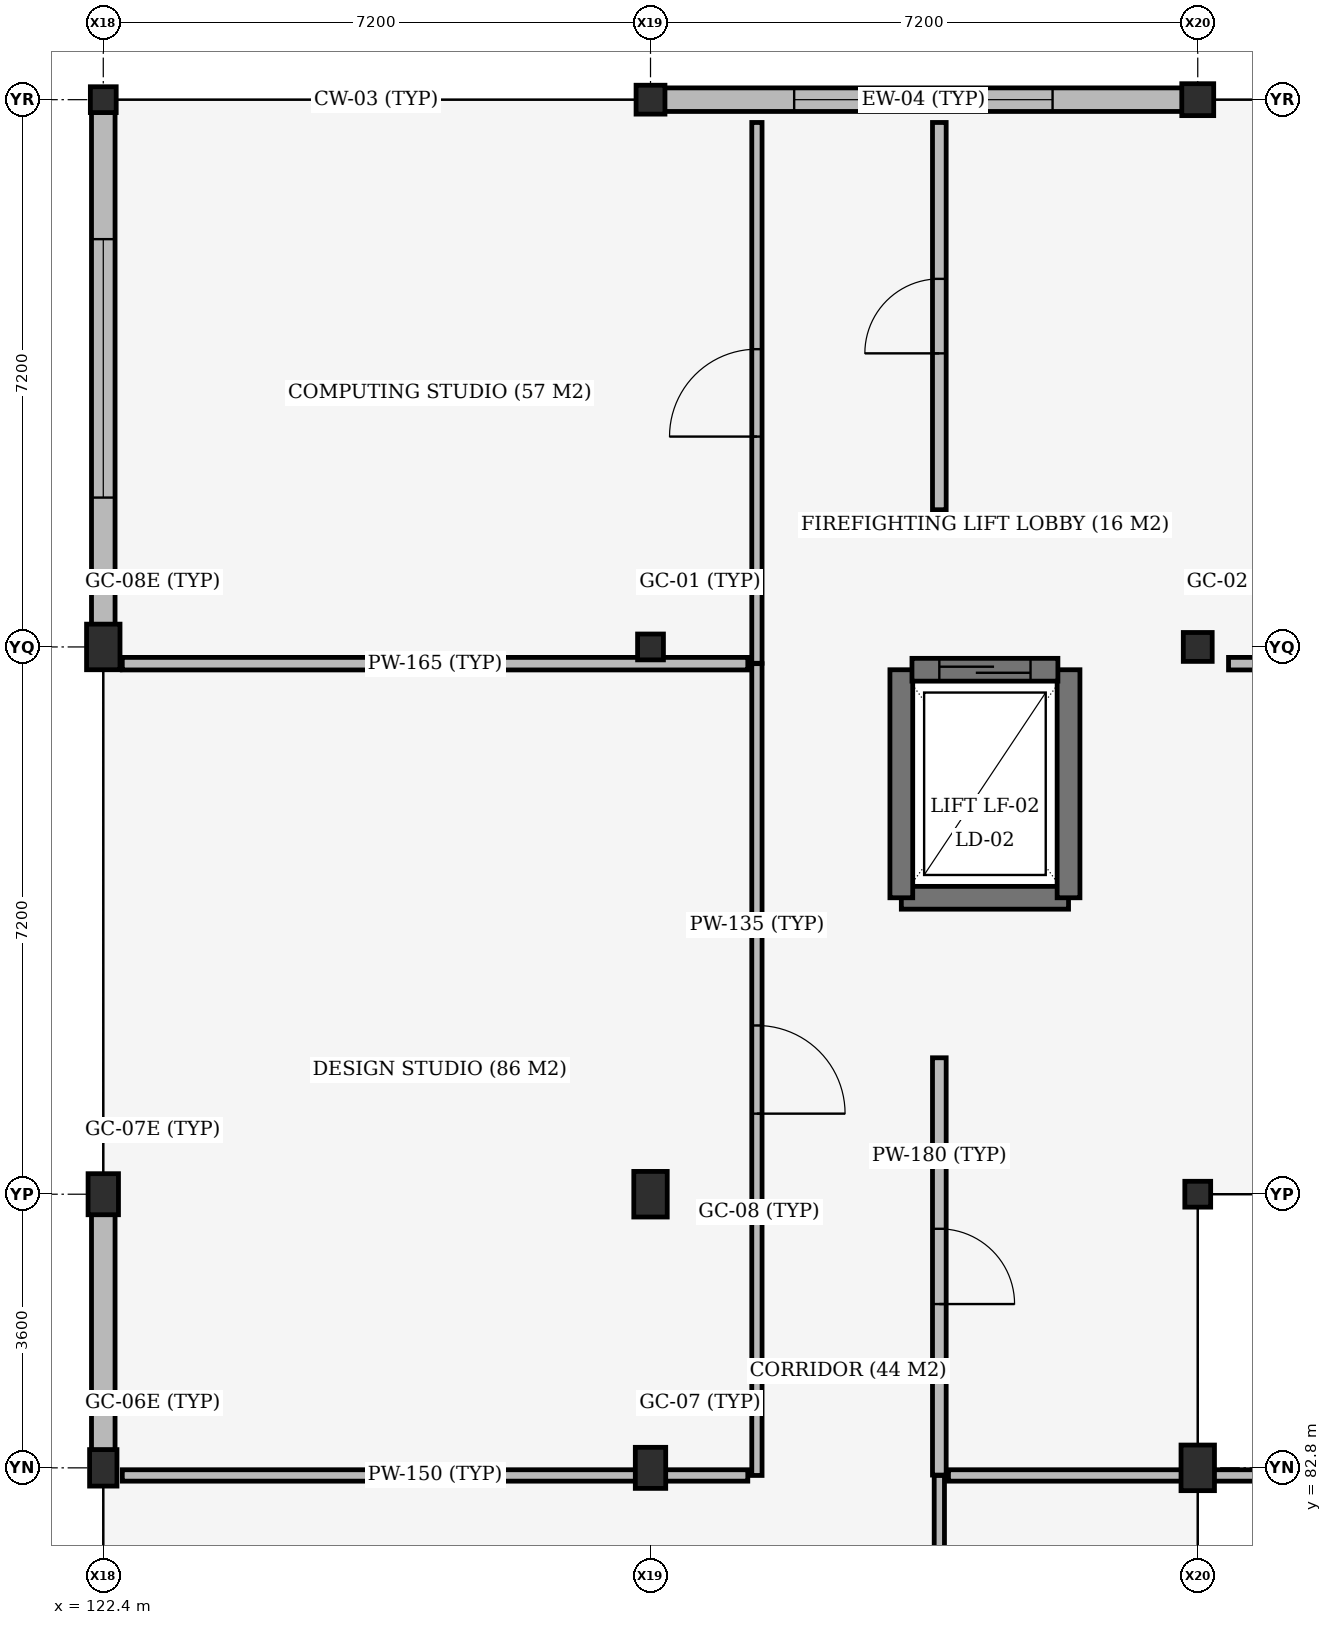
"""IFC4 building model, lengths in metres.
Left out: names, types, materials, properties, quantities, classifications, styles, units other than length and angle.
Written with IfcOpenShell. Run it as: python <this file> out.ifc"""

import sys

from ifc_helpers import new_model, si_unit, direction, frame, frame_2d, origin, origin_2d, place, context, subcontext, project, spatial, rectangle, extrude, element, fill, save


model = new_model("IFC4")
c1 = context("Model", 3, precision=1e-05, world=origin(), true_north=direction((0.0, 1.0)))
c2 = subcontext(c1, "Body", "Model", "MODEL_VIEW")
j1 = project(units=[si_unit("LENGTHUNIT", "METRE"), si_unit("PLANEANGLEUNIT", "RADIAN")], contexts=[c1])
p1 = place(None, origin())
s1 = spatial("IfcSite", under=j1, at=p1, CompositionType="ELEMENT")
p2 = place(p1, origin())
s2 = spatial("IfcBuilding", under=s1, at=p2, CompositionType="ELEMENT")
p3 = place(p2, frame((0.0, 0.0, 13.8)))
s3 = spatial("IfcBuildingStorey", under=s2, at=p3, CompositionType="ELEMENT", Elevation=13.8)
p4 = place(p3, frame((122.4, 82.8, 0.0), z_axis=(0.0, 0.0, 1.0), x_axis=(1.0, 0.0, 0.0)))
e1 = element("IfcColumn", 1, at=p4, inside=s3, PredefinedType="COLUMN", context=c2, shape_type="SweptSolid", body=[
    extrude(rectangle(XDim=0.36, YDim=0.48, at=origin_2d()), origin(), (0.0, 0.0, 1.0), 3.935),
])
p5 = place(p3, frame((122.4, 86.4, 0.0), z_axis=(0.0, 0.0, 1.0), x_axis=(1.0, 0.0, 0.0)))
e2 = element("IfcColumn", 2, at=p5, inside=s3, PredefinedType="COLUMN", context=c2, shape_type="SweptSolid", body=[
    extrude(rectangle(XDim=0.4, YDim=0.54, at=origin_2d()), origin(), (0.0, 0.0, 1.0), 3.935),
])
p6 = place(p3, frame((122.4, 93.6, 0.0), z_axis=(0.0, 0.0, 1.0), x_axis=(1.0, 0.0, 0.0)))
e3 = element("IfcColumn", 3, at=p6, inside=s3, PredefinedType="COLUMN", context=c2, shape_type="SweptSolid", body=[
    extrude(rectangle(XDim=0.44, YDim=0.6, at=origin_2d()), origin(), (0.0, 0.0, 1.0), 3.935),
])
p7 = place(p3, frame((122.4, 100.8, 0.0), z_axis=(0.0, 0.0, 1.0), x_axis=(1.0, 0.0, 0.0)))
e4 = element("IfcColumn", 4, at=p7, inside=s3, PredefinedType="COLUMN", context=c2, shape_type="SweptSolid", body=[
    extrude(rectangle(XDim=0.34, YDim=0.34, at=origin_2d()), origin(), (0.0, 0.0, 1.0), 3.935),
])
p8 = place(p3, frame((129.6, 82.8, 0.0), z_axis=(0.0, 0.0, 1.0), x_axis=(1.0, 0.0, 0.0)))
e5 = element("IfcColumn", 5, at=p8, inside=s3, PredefinedType="COLUMN", context=c2, shape_type="SweptSolid", body=[
    extrude(rectangle(XDim=0.4, YDim=0.54, at=origin_2d()), origin(), (0.0, 0.0, 1.0), 3.935),
])
p9 = place(p3, frame((129.6, 86.4, 0.0), z_axis=(0.0, 0.0, 1.0), x_axis=(1.0, 0.0, 0.0)))
e6 = element("IfcColumn", 6, at=p9, inside=s3, PredefinedType="COLUMN", context=c2, shape_type="SweptSolid", body=[
    extrude(rectangle(XDim=0.44, YDim=0.6, at=origin_2d()), origin(), (0.0, 0.0, 1.0), 3.935),
])
p10 = place(p3, frame((129.6, 93.6, 0.0), z_axis=(0.0, 0.0, 1.0), x_axis=(1.0, 0.0, 0.0)))
e7 = element("IfcColumn", 7, at=p10, inside=s3, PredefinedType="COLUMN", context=c2, shape_type="SweptSolid", body=[
    extrude(rectangle(XDim=0.34, YDim=0.34, at=origin_2d()), origin(), (0.0, 0.0, 1.0), 3.935),
])
p11 = place(p3, frame((129.6, 100.8, 0.0), z_axis=(0.0, 0.0, 1.0), x_axis=(1.0, 0.0, 0.0)))
e8 = element("IfcColumn", 8, at=p11, inside=s3, PredefinedType="COLUMN", context=c2, shape_type="SweptSolid", body=[
    extrude(rectangle(XDim=0.38, YDim=0.38, at=origin_2d()), origin(), (0.0, 0.0, 1.0), 3.935),
])
p12 = place(p3, frame((136.8, 82.8, 0.0), z_axis=(0.0, 0.0, 1.0), x_axis=(1.0, 0.0, 0.0)))
e9 = element("IfcColumn", 9, at=p12, inside=s3, PredefinedType="COLUMN", context=c2, shape_type="SweptSolid", body=[
    extrude(rectangle(XDim=0.44, YDim=0.6, at=origin_2d()), origin(), (0.0, 0.0, 1.0), 3.935),
])
p13 = place(p3, frame((136.8, 86.4, 0.0), z_axis=(0.0, 0.0, 1.0), x_axis=(1.0, 0.0, 0.0)))
e10 = element("IfcColumn", 10, at=p13, inside=s3, PredefinedType="COLUMN", context=c2, shape_type="SweptSolid", body=[
    extrude(rectangle(XDim=0.34, YDim=0.34, at=origin_2d()), origin(), (0.0, 0.0, 1.0), 3.935),
])
p14 = place(p3, frame((136.8, 93.6, 0.0), z_axis=(0.0, 0.0, 1.0), x_axis=(1.0, 0.0, 0.0)))
e11 = element("IfcColumn", 11, at=p14, inside=s3, PredefinedType="COLUMN", context=c2, shape_type="SweptSolid", body=[
    extrude(rectangle(XDim=0.38, YDim=0.38, at=origin_2d()), origin(), (0.0, 0.0, 1.0), 3.935),
])
p15 = place(p3, frame((136.8, 100.8, 0.0), z_axis=(0.0, 0.0, 1.0), x_axis=(1.0, 0.0, 0.0)))
e12 = element("IfcColumn", 12, at=p15, inside=s3, PredefinedType="COLUMN", context=c2, shape_type="SweptSolid", body=[
    extrude(rectangle(XDim=0.42, YDim=0.42, at=origin_2d()), origin(), (0.0, 0.0, 1.0), 3.935),
])
p16 = place(p3, frame((132.9, 90.3, 0.0), z_axis=(0.0, 0.0, 1.0), x_axis=(1.0, 0.0, 0.0)))
e13 = element("IfcWall", 13, at=p16, inside=s3, PredefinedType="SHEAR", context=c2, shape_type="SweptSolid", body=[
    extrude(rectangle(XDim=2.2, YDim=0.3, at=frame_2d((1.1, 0.0))), origin(), (0.0, 0.0, 1.0), 3.935),
])
for number, where, z_axis, x_axis in (
    (14, (132.9, 93.3, 0.0), (0.0, 0.0, 1.0), (0.0, -1.0, 0.0)),
    (15, (135.1, 90.3, 0.0), (0.0, 0.0, 1.0), (0.0, 1.0, 0.0)),
):
    element("IfcWall", number, at=place(p3, frame(where, z_axis=z_axis, x_axis=x_axis)), inside=s3, PredefinedType="SHEAR", context=c2, shape_type="SweptSolid", body=[
        extrude(rectangle(XDim=3.0, YDim=0.3, at=frame_2d((1.5, 0.0))), origin(), (0.0, 0.0, 1.0), 3.935),
    ])
p17 = place(p3, frame((129.782, 100.8, 0.0), z_axis=(0.0, 0.0, 1.0), x_axis=(1.0, 0.0, 0.0)))
e16 = element("IfcWall", 16, at=p17, inside=s3, PredefinedType="STANDARD", context=c2, shape_type="SweptSolid", body=[
    extrude(rectangle(XDim=6.816, YDim=0.31, at=frame_2d((3.408, 0.0))), origin(), (0.0, 0.0, 1.0), 3.195),
])
p18 = place(p17, frame((1.708, 0.0, 0.9)))
e17 = element("IfcOpeningElement", 17, at=p18, cuts=e16, PredefinedType="OPENING", context=c2, shape_type="SweptSolid", body=[
    extrude(rectangle(XDim=3.4, YDim=1.5, at=frame_2d((1.7, 0.75))), frame((0.0, 0.165, 0.0), z_axis=(0.0, -1.0, 0.0), x_axis=(1.0, 0.0, 0.0)), (0.0, 0.0, 1.0), 0.33),
])
p19 = place(p3, frame((122.4, 83.032, 0.0), z_axis=(0.0, 0.0, 1.0), x_axis=(0.0, 1.0, 0.0)))
e18 = element("IfcWall", 18, at=p19, inside=s3, PredefinedType="STANDARD", context=c2, shape_type="SweptSolid", body=[
    extrude(rectangle(XDim=3.106, YDim=0.31, at=frame_2d((1.553, 0.0))), origin(), (0.0, 0.0, 1.0), 3.295),
])
p20 = place(p3, frame((122.4, 93.892, 0.0), z_axis=(0.0, 0.0, 1.0), x_axis=(0.0, 1.0, 0.0)))
e19 = element("IfcWall", 19, at=p20, inside=s3, PredefinedType="STANDARD", context=c2, shape_type="SweptSolid", body=[
    extrude(rectangle(XDim=6.746, YDim=0.31, at=frame_2d((3.373, 0.0))), origin(), (0.0, 0.0, 1.0), 3.195),
])
p21 = place(p20, frame((1.673, 0.0, 0.9)))
e20 = element("IfcOpeningElement", 20, at=p21, cuts=e19, PredefinedType="OPENING", context=c2, shape_type="SweptSolid", body=[
    extrude(rectangle(XDim=3.4, YDim=1.5, at=frame_2d((1.7, 0.75))), frame((0.0, 0.165, 0.0), z_axis=(0.0, -1.0, 0.0), x_axis=(1.0, 0.0, 0.0)), (0.0, 0.0, 1.0), 0.33),
])
p22 = place(p3, frame((133.04, 93.3, 0.0), z_axis=(0.0, 0.0, 1.0), x_axis=(1.0, 0.0, 0.0)))
e21 = element("IfcWall", 21, at=p22, inside=s3, PredefinedType="SHEAR", context=c2, shape_type="SweptSolid", body=[
    extrude(rectangle(XDim=1.92, YDim=0.3, at=frame_2d((0.96, 0.0))), origin(), (0.0, 0.0, 1.0), 3.935),
])
p23 = place(p22, frame((0.36, 0.0, 0.0)))
e22 = element("IfcOpeningElement", 22, at=p23, cuts=e21, PredefinedType="OPENING", context=c2, shape_type="SweptSolid", body=[
    extrude(rectangle(XDim=1.2, YDim=2.1, at=frame_2d((0.6, 1.05))), frame((0.0, 0.16, 0.0), z_axis=(0.0, -1.0, 0.0), x_axis=(1.0, 0.0, 0.0)), (0.0, 0.0, 1.0), 0.32),
])
p24 = place(p3, frame((122.65, 82.7, 0.0), z_axis=(0.0, 0.0, 1.0), x_axis=(1.0, 0.0, 0.0)))
e23 = element("IfcWall", 23, at=p24, inside=s3, PredefinedType="PARTITIONING", context=c2, shape_type="SweptSolid", body=[
    extrude(rectangle(XDim=8.23, YDim=0.15, at=frame_2d((4.115, 0.0))), origin(), (0.0, 0.0, 1.0), 3.355),
])
p25 = place(p3, frame((131.0, 82.7, 0.0), z_axis=(0.0, 0.0, 1.0), x_axis=(0.0, 1.0, 0.0)))
e24 = element("IfcWall", 24, at=p25, inside=s3, PredefinedType="PARTITIONING", context=c2, shape_type="SweptSolid", body=[
    extrude(rectangle(XDim=10.68, YDim=0.135, at=frame_2d((5.34, 0.0))), origin(), (0.0, 0.0, 1.0), 3.355),
])
p26 = place(p25, frame((4.76, 0.0, 0.0)))
e25 = element("IfcOpeningElement", 25, at=p26, cuts=e24, PredefinedType="OPENING", context=c2, shape_type="SweptSolid", body=[
    extrude(rectangle(XDim=1.16, YDim=2.2, at=frame_2d((0.58, 1.1))), frame((0.0, 0.077, 0.0), z_axis=(0.0, -1.0, 0.0), x_axis=(1.0, 0.0, 0.0)), (0.0, 0.0, 1.0), 0.155),
])
p27 = place(p3, frame((122.65, 93.38, 0.0), z_axis=(0.0, 0.0, 1.0), x_axis=(1.0, 0.0, 0.0)))
e26 = element("IfcWall", 26, at=p27, inside=s3, PredefinedType="PARTITIONING", context=c2, shape_type="SweptSolid", body=[
    extrude(rectangle(XDim=8.23, YDim=0.165, at=frame_2d((4.115, 0.0))), origin(), (0.0, 0.0, 1.0), 3.295),
])
p28 = place(p3, frame((131.0, 93.385, 0.0), z_axis=(0.0, 0.0, 1.0), x_axis=(0.0, 1.0, 0.0)))
e27 = element("IfcWall", 27, at=p28, inside=s3, PredefinedType="PARTITIONING", context=c2, shape_type="SweptSolid", body=[
    extrude(rectangle(XDim=7.115, YDim=0.135, at=frame_2d((3.558, 0.0))), origin(), (0.0, 0.0, 1.0), 3.295),
])
p29 = place(p28, frame((2.982, 0.0, 0.0)))
e28 = element("IfcOpeningElement", 28, at=p29, cuts=e27, PredefinedType="OPENING", context=c2, shape_type="SweptSolid", body=[
    extrude(rectangle(XDim=1.15, YDim=2.2, at=frame_2d((0.575, 1.1))), frame((0.0, 0.077, 0.0), z_axis=(0.0, -1.0, 0.0), x_axis=(1.0, 0.0, 0.0)), (0.0, 0.0, 1.0), 0.155),
])
p30 = place(p3, frame((133.4, 74.055, 0.0), z_axis=(0.0, 0.0, 1.0), x_axis=(0.0, 1.0, 0.0)))
e29 = element("IfcWall", 29, at=p30, inside=s3, PredefinedType="PARTITIONING", context=c2, shape_type="SweptSolid", body=[
    extrude(rectangle(XDim=8.645, YDim=0.135, at=frame_2d((4.323, 0.0))), origin(), (0.0, 0.0, 1.0), 3.295),
])
p31 = place(p30, frame((3.748, 0.0, 0.0)))
e30 = element("IfcOpeningElement", 30, at=p31, cuts=e29, PredefinedType="OPENING", context=c2, shape_type="SweptSolid", body=[
    extrude(rectangle(XDim=1.15, YDim=2.2, at=frame_2d((0.575, 1.1))), frame((0.0, 0.077, 0.0), z_axis=(0.0, -1.0, 0.0), x_axis=(1.0, 0.0, 0.0)), (0.0, 0.0, 1.0), 0.155),
])
p32 = place(p3, frame((133.52, 82.7, 0.0), z_axis=(0.0, 0.0, 1.0), x_axis=(1.0, 0.0, 0.0)))
e31 = element("IfcWall", 31, at=p32, inside=s3, PredefinedType="PARTITIONING", context=c2, shape_type="SweptSolid", body=[
    extrude(rectangle(XDim=3.36, YDim=0.15, at=frame_2d((1.68, 0.0))), origin(), (0.0, 0.0, 1.0), 3.355),
])
p33 = place(p3, frame((133.4, 82.705, 0.0), z_axis=(0.0, 0.0, 1.0), x_axis=(0.0, 1.0, 0.0)))
e32 = element("IfcWall", 32, at=p33, inside=s3, PredefinedType="PARTITIONING", context=c2, shape_type="SweptSolid", body=[
    extrude(rectangle(XDim=5.49, YDim=0.18, at=frame_2d((2.745, 0.0))), origin(), (0.0, 0.0, 1.0), 3.355),
])
p34 = place(p33, frame((2.25, 0.0, 0.0)))
e33 = element("IfcOpeningElement", 33, at=p34, cuts=e32, PredefinedType="OPENING", context=c2, shape_type="SweptSolid", body=[
    extrude(rectangle(XDim=0.99, YDim=2.18, at=frame_2d((0.495, 1.09))), frame((0.0, 0.1, 0.0), z_axis=(0.0, -1.0, 0.0), x_axis=(1.0, 0.0, 0.0)), (0.0, 0.0, 1.0), 0.2),
])
p35 = place(p3, frame((136.885, 82.7, 0.0), z_axis=(0.0, 0.0, 1.0), x_axis=(1.0, 0.0, 0.0)))
e34 = element("IfcWall", 34, at=p35, inside=s3, PredefinedType="PARTITIONING", context=c2, shape_type="SweptSolid", body=[
    extrude(rectangle(XDim=22.795, YDim=0.15, at=frame_2d((11.397, 0.0))), origin(), (0.0, 0.0, 1.0), 3.195),
])
p36 = place(p3, frame((137.205, 93.38, 0.0), z_axis=(0.0, 0.0, 1.0), x_axis=(1.0, 0.0, 0.0)))
e35 = element("IfcWall", 35, at=p36, inside=s3, PredefinedType="PARTITIONING", context=c2, shape_type="SweptSolid", body=[
    extrude(rectangle(XDim=21.99, YDim=0.165, at=frame_2d((10.995, 0.0))), origin(), (0.0, 0.0, 1.0), 3.195),
])
p37 = place(p3, frame((133.4, 95.405, 0.0), z_axis=(0.0, 0.0, 1.0), x_axis=(0.0, 1.0, 0.0)))
e36 = element("IfcWall", 36, at=p37, inside=s3, PredefinedType="PARTITIONING", context=c2, shape_type="SweptSolid", body=[
    extrude(rectangle(XDim=5.095, YDim=0.18, at=frame_2d((2.547, 0.0))), origin(), (0.0, 0.0, 1.0), 3.935),
])
p38 = place(p37, frame((2.058, 0.0, 0.0)))
e37 = element("IfcOpeningElement", 37, at=p38, cuts=e36, PredefinedType="OPENING", context=c2, shape_type="SweptSolid", body=[
    extrude(rectangle(XDim=0.98, YDim=2.18, at=frame_2d((0.49, 1.09))), frame((0.0, 0.1, 0.0), z_axis=(0.0, -1.0, 0.0), x_axis=(1.0, 0.0, 0.0)), (0.0, 0.0, 1.0), 0.2),
])
p39 = place(p18, origin())
e38 = element("IfcWindow", 38, at=p39, inside=s3, PartitioningType="DOUBLE_PANEL_VERTICAL", PredefinedType="WINDOW", context=c2, shape_type="SweptSolid", body=[
    extrude(rectangle(XDim=3.4, YDim=1.5, at=frame_2d((1.7, 0.75))), frame((0.0, 0.03, 0.0), z_axis=(0.0, -1.0, 0.0), x_axis=(1.0, 0.0, 0.0)), (0.0, 0.0, 1.0), 0.06),
])
fill(e17, e38)
p40 = place(p21, origin())
e39 = element("IfcWindow", 39, at=p40, inside=s3, PartitioningType="DOUBLE_PANEL_VERTICAL", PredefinedType="WINDOW", context=c2, shape_type="SweptSolid", body=[
    extrude(rectangle(XDim=3.4, YDim=1.5, at=frame_2d((1.7, 0.75))), frame((0.0, 0.03, 0.0), z_axis=(0.0, -1.0, 0.0), x_axis=(1.0, 0.0, 0.0)), (0.0, 0.0, 1.0), 0.06),
])
fill(e20, e39)
p41 = place(p23, origin())
e40 = element("IfcDoor", 40, at=p41, inside=s3, OperationType="SLIDING_TO_LEFT", PredefinedType="DOOR", context=c2, shape_type="SweptSolid", body=[
    extrude(rectangle(XDim=1.2, YDim=2.1, at=frame_2d((0.6, 1.05))), frame((0.0, 0.025, 0.0), z_axis=(0.0, -1.0, 0.0), x_axis=(1.0, 0.0, 0.0)), (0.0, 0.0, 1.0), 0.05),
])
fill(e22, e40)
p42 = place(p26, origin())
e41 = element("IfcDoor", 41, at=p42, inside=s3, OperationType="SINGLE_SWING_RIGHT", PredefinedType="DOOR", context=c2, shape_type="SweptSolid", body=[
    extrude(rectangle(XDim=1.16, YDim=2.2, at=frame_2d((0.58, 1.1))), frame((0.0, 0.025, 0.0), z_axis=(0.0, -1.0, 0.0), x_axis=(1.0, 0.0, 0.0)), (0.0, 0.0, 1.0), 0.05),
])
fill(e25, e41)
p43 = place(p29, origin())
e42 = element("IfcDoor", 42, at=p43, inside=s3, OperationType="SINGLE_SWING_LEFT", PredefinedType="DOOR", context=c2, shape_type="SweptSolid", body=[
    extrude(rectangle(XDim=1.15, YDim=2.2, at=frame_2d((0.575, 1.1))), frame((0.0, 0.025, 0.0), z_axis=(0.0, -1.0, 0.0), x_axis=(1.0, 0.0, 0.0)), (0.0, 0.0, 1.0), 0.05),
])
fill(e28, e42)
p44 = place(p34, origin())
e43 = element("IfcDoor", 43, at=p44, inside=s3, OperationType="SINGLE_SWING_RIGHT", PredefinedType="DOOR", context=c2, shape_type="SweptSolid", body=[
    extrude(rectangle(XDim=0.99, YDim=2.18, at=frame_2d((0.495, 1.09))), frame((0.0, 0.025, 0.0), z_axis=(0.0, -1.0, 0.0), x_axis=(1.0, 0.0, 0.0)), (0.0, 0.0, 1.0), 0.05),
])
fill(e33, e43)
p45 = place(p38, origin())
e44 = element("IfcDoor", 44, at=p45, inside=s3, OperationType="SINGLE_SWING_LEFT", PredefinedType="DOOR", context=c2, shape_type="SweptSolid", body=[
    extrude(rectangle(XDim=0.98, YDim=2.18, at=frame_2d((0.49, 1.09))), frame((0.0, 0.025, 0.0), z_axis=(0.0, -1.0, 0.0), x_axis=(1.0, 0.0, 0.0)), (0.0, 0.0, 1.0), 0.05),
])
fill(e37, e44)
save(model, sys.argv[1])
